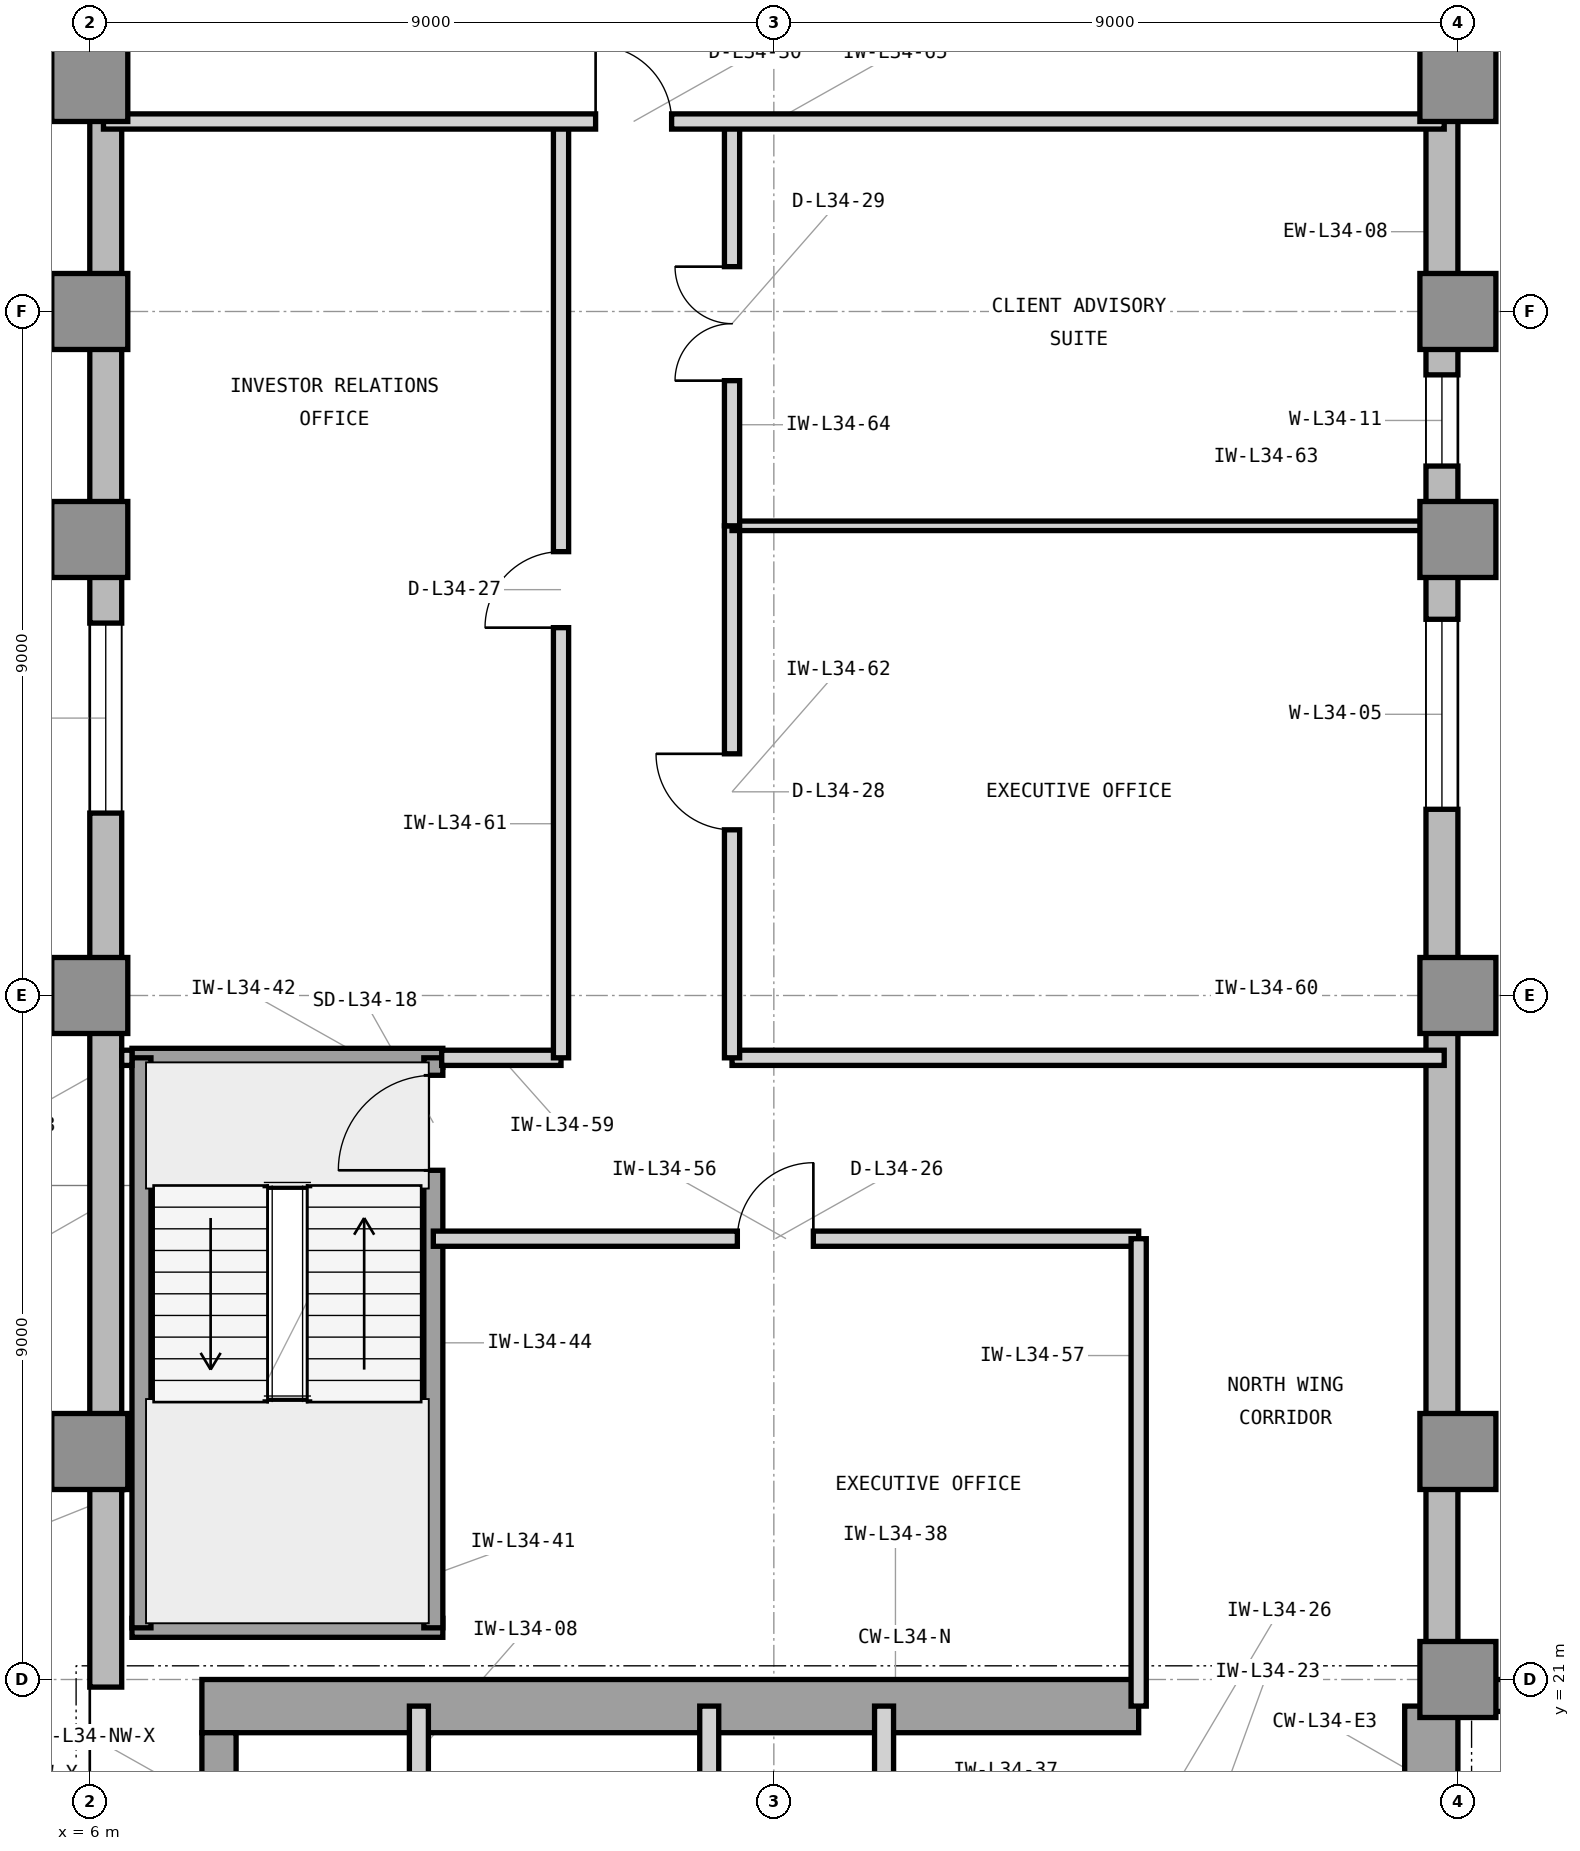
"""IFC4 building model, lengths in metres.
Left out: names, types, materials, properties, quantities, classifications, styles, units other than length and angle.
Written with IfcOpenShell. Run it as: python <this file> out.ifc"""

import sys

from ifc_helpers import new_model, si_unit, direction, frame, frame_2d, origin, origin_2d, place, context, subcontext, project, spatial, rectangle, extrude, element, fill, save


model = new_model("IFC4")
c1 = context("Model", 3, precision=1e-05, world=origin(), true_north=direction((0.0, 1.0)))
c2 = subcontext(c1, "Body", "Model", "MODEL_VIEW")
j1 = project(units=[si_unit("LENGTHUNIT", "METRE"), si_unit("PLANEANGLEUNIT", "RADIAN")], contexts=[c1])
p1 = place(None, origin())
s1 = spatial("IfcSite", under=j1, at=p1, CompositionType="ELEMENT")
p2 = place(p1, origin())
s2 = spatial("IfcBuilding", under=s1, at=p2, CompositionType="ELEMENT")
p3 = place(p2, frame((0.0, 0.0, 144.0)))
s3 = spatial("IfcBuildingStorey", under=s2, at=p3, CompositionType="ELEMENT", Elevation=144.0)
p4 = place(p3, frame((7.475, 20.65, 0.0), z_axis=(0.0, 0.0, 1.0), x_axis=(1.0, 0.0, 0.0)))
e1 = element("IfcWall", 1, at=p4, inside=s3, PredefinedType="SHEAR", context=c2, shape_type="SweptSolid", body=[
    extrude(rectangle(XDim=12.325, YDim=0.7, at=frame_2d((6.163, 0.0))), origin(), (0.0, 0.0, 1.0), 3.9),
])
p5 = place(p3, frame((23.65, 16.6, 0.0), z_axis=(0.0, 0.0, 1.0), x_axis=(0.0, 1.0, 0.0)))
e2 = element("IfcWall", 2, at=p5, inside=s3, PredefinedType="SHEAR", context=c2, shape_type="SweptSolid", body=[
    extrude(rectangle(XDim=4.05, YDim=0.7, at=frame_2d((2.025, 0.0))), origin(), (0.0, 0.0, 1.0), 3.9),
])
p6 = place(p3, frame((7.7, 19.575, 0.0), z_axis=(0.0, 0.0, 1.0), x_axis=(0.0, 1.0, 0.0)))
e3 = element("IfcWall", 3, at=p6, inside=s3, PredefinedType="SHEAR", context=c2, shape_type="SweptSolid", body=[
    extrude(rectangle(XDim=0.725, YDim=0.45, at=frame_2d((0.363, 0.0))), origin(), (0.0, 0.0, 1.0), 3.9),
])
for number, where, z_axis, x_axis in (
    (4, (24.0, 21.0, 0.0), (0.0, 0.0, 1.0), (1.0, 0.0, 0.0)),
    (5, (6.0, 24.0, 0.0), (0.0, 0.0, 1.0), (1.0, 0.0, 0.0)),
    (6, (24.0, 24.0, 0.0), (0.0, 0.0, 1.0), (1.0, 0.0, 0.0)),
    (7, (6.0, 30.0, 0.0), (0.0, 0.0, 1.0), (1.0, 0.0, 0.0)),
    (8, (24.0, 30.0, 0.0), (0.0, 0.0, 1.0), (1.0, 0.0, 0.0)),
    (9, (6.0, 36.0, 0.0), (0.0, 0.0, 1.0), (1.0, 0.0, 0.0)),
    (10, (24.0, 36.0, 0.0), (0.0, 0.0, 1.0), (1.0, 0.0, 0.0)),
    (11, (6.0, 39.0, 0.0), (0.0, 0.0, 1.0), (1.0, 0.0, 0.0)),
    (12, (24.0, 39.0, 0.0), (0.0, 0.0, 1.0), (1.0, 0.0, 0.0)),
    (13, (6.0, 42.0, 0.0), (0.0, 0.0, 1.0), (1.0, 0.0, 0.0)),
    (14, (24.0, 42.0, 0.0), (0.0, 0.0, 1.0), (1.0, 0.0, 0.0)),
):
    element("IfcColumn", number, at=place(p3, frame(where, z_axis=z_axis, x_axis=x_axis)), inside=s3, PredefinedType="COLUMN", context=c2, shape_type="SweptSolid", body=[
        extrude(rectangle(XDim=1.0, YDim=1.0, at=origin_2d()), origin(), (0.0, 0.0, 1.0), 3.9),
    ])
p7 = place(p3, frame((58.4, 20.79, 0.0), z_axis=(0.0, 0.0, 1.0), x_axis=(-1.0, 0.0, 0.0)))
e15 = element("IfcWall", 15, at=p7, inside=s3, PredefinedType="STANDARD", context=c2, shape_type="SweptSolid", body=[
    extrude(rectangle(XDim=34.4, YDim=0.42, at=frame_2d((17.2, 0.0))), origin(), (0.0, 0.0, 1.0), 3.7),
])
p8 = place(p7, frame((20.864, 0.0, 0.85)))
e16 = element("IfcOpeningElement", 16, at=p8, cuts=e15, PredefinedType="OPENING", context=c2, shape_type="SweptSolid", body=[
    extrude(rectangle(XDim=2.5, YDim=2.25, at=frame_2d((1.25, 1.125))), frame((0.0, 0.22, 0.0), z_axis=(0.0, -1.0, 0.0), x_axis=(1.0, 0.0, 0.0)), (0.0, 0.0, 1.0), 0.44),
])
p9 = place(p7, frame((32.222, 0.0, 0.85)))
e17 = element("IfcOpeningElement", 17, at=p9, cuts=e15, PredefinedType="OPENING", context=c2, shape_type="SweptSolid", body=[
    extrude(rectangle(XDim=1.2, YDim=2.25, at=frame_2d((0.6, 1.125))), frame((0.0, 0.22, 0.0), z_axis=(0.0, -1.0, 0.0), x_axis=(1.0, 0.0, 0.0)), (0.0, 0.0, 1.0), 0.44),
])
p10 = place(p7, frame((11.386, 0.0, 0.85)))
e18 = element("IfcOpeningElement", 18, at=p10, cuts=e15, PredefinedType="OPENING", context=c2, shape_type="SweptSolid", body=[
    extrude(rectangle(XDim=2.5, YDim=2.25, at=frame_2d((1.25, 1.125))), frame((0.0, 0.22, 0.0), z_axis=(0.0, -1.0, 0.0), x_axis=(1.0, 0.0, 0.0)), (0.0, 0.0, 1.0), 0.44),
])
p11 = place(p3, frame((23.79, 21.0, 0.0), z_axis=(0.0, 0.0, 1.0), x_axis=(0.0, 1.0, 0.0)))
e19 = element("IfcWall", 19, at=p11, inside=s3, PredefinedType="STANDARD", context=c2, shape_type="SweptSolid", body=[
    extrude(rectangle(XDim=25.4, YDim=0.42, at=frame_2d((12.7, 0.0))), origin(), (0.0, 0.0, 1.0), 3.7),
])
p12 = place(p11, frame((11.45, 0.0, 0.85)))
e20 = element("IfcOpeningElement", 20, at=p12, cuts=e19, PredefinedType="OPENING", context=c2, shape_type="SweptSolid", body=[
    extrude(rectangle(XDim=2.5, YDim=2.25, at=frame_2d((1.25, 1.125))), frame((0.0, 0.22, 0.0), z_axis=(0.0, -1.0, 0.0), x_axis=(1.0, 0.0, 0.0)), (0.0, 0.0, 1.0), 0.44),
])
p13 = place(p11, frame((15.966, 0.0, 0.85)))
e21 = element("IfcOpeningElement", 21, at=p13, cuts=e19, PredefinedType="OPENING", context=c2, shape_type="SweptSolid", body=[
    extrude(rectangle(XDim=1.2, YDim=2.25, at=frame_2d((0.6, 1.125))), frame((0.0, 0.22, 0.0), z_axis=(0.0, -1.0, 0.0), x_axis=(1.0, 0.0, 0.0)), (0.0, 0.0, 1.0), 0.44),
])
p14 = place(p3, frame((6.21, 46.4, 0.0), z_axis=(0.0, 0.0, 1.0), x_axis=(0.0, -1.0, 0.0)))
e22 = element("IfcWall", 22, at=p14, inside=s3, PredefinedType="STANDARD", context=c2, shape_type="SweptSolid", body=[
    extrude(rectangle(XDim=25.5, YDim=0.42, at=frame_2d((12.75, 0.0))), origin(), (0.0, 0.0, 1.0), 3.7),
])
p15 = place(p14, frame((11.5, 0.0, 0.85)))
e23 = element("IfcOpeningElement", 23, at=p15, cuts=e22, PredefinedType="OPENING", context=c2, shape_type="SweptSolid", body=[
    extrude(rectangle(XDim=2.5, YDim=2.25, at=frame_2d((1.25, 1.125))), frame((0.0, 0.22, 0.0), z_axis=(0.0, -1.0, 0.0), x_axis=(1.0, 0.0, 0.0)), (0.0, 0.0, 1.0), 0.44),
])
p16 = place(p3, frame((10.33, 19.45, 0.0), z_axis=(0.0, 0.0, 1.0), x_axis=(0.0, 1.0, 0.0)))
e24 = element("IfcWall", 24, at=p16, inside=s3, PredefinedType="PARTITIONING", context=c2, shape_type="SweptSolid", body=[
    extrude(rectangle(XDim=1.2, YDim=0.25, at=frame_2d((0.6, 0.0))), origin(), (0.0, 0.0, 1.0), 2.994),
])
for number, where, z_axis, x_axis in (
    (25, (14.15, 16.7, 0.0), (0.0, 0.0, 1.0), (0.0, 1.0, 0.0)),
    (26, (16.45, 16.7, 0.0), (0.0, 0.0, 1.0), (0.0, 1.0, 0.0)),
):
    element("IfcWall", number, at=place(p3, frame(where, z_axis=z_axis, x_axis=x_axis)), inside=s3, PredefinedType="PARTITIONING", context=c2, shape_type="SweptSolid", body=[
        extrude(rectangle(XDim=3.95, YDim=0.25, at=frame_2d((1.975, 0.0))), origin(), (0.0, 0.0, 1.0), 3.69),
    ])
for number, where, z_axis, x_axis in (
    (27, (6.555, 21.68, 0.0), (0.0, 0.0, 1.0), (1.0, 0.0, 0.0)),
    (28, (6.555, 29.18, 0.0), (0.0, 0.0, 1.0), (1.0, 0.0, 0.0)),
):
    element("IfcWall", number, at=place(p3, frame(where, z_axis=z_axis, x_axis=x_axis)), inside=s3, PredefinedType="SHEAR", context=c2, shape_type="SweptSolid", body=[
        extrude(rectangle(XDim=4.09, YDim=0.25, at=frame_2d((2.045, 0.0))), origin(), (0.0, 0.0, 1.0), 3.9),
    ])
p17 = place(p3, frame((6.68, 21.68, 0.0), z_axis=(0.0, 0.0, 1.0), x_axis=(0.0, 1.0, 0.0)))
e29 = element("IfcWall", 29, at=p17, inside=s3, PredefinedType="SHEAR", context=c2, shape_type="SweptSolid", body=[
    extrude(rectangle(XDim=7.5, YDim=0.25, at=frame_2d((3.75, 0.0))), origin(), (0.0, 0.0, 1.0), 3.9),
])
p18 = place(p3, frame((10.52, 21.68, 0.0), z_axis=(0.0, 0.0, 1.0), x_axis=(0.0, 1.0, 0.0)))
e30 = element("IfcWall", 30, at=p18, inside=s3, PredefinedType="SHEAR", context=c2, shape_type="SweptSolid", body=[
    extrude(rectangle(XDim=7.5, YDim=0.25, at=frame_2d((3.75, 0.0))), origin(), (0.0, 0.0, 1.0), 3.9),
])
p19 = place(p18, frame((6.02, 0.0, 0.0)))
e31 = element("IfcOpeningElement", 31, at=p19, cuts=e30, PredefinedType="OPENING", context=c2, shape_type="SweptSolid", body=[
    extrude(rectangle(XDim=1.25, YDim=2.2, at=frame_2d((0.625, 1.1))), frame((0.0, 0.135, 0.0), z_axis=(0.0, -1.0, 0.0), x_axis=(1.0, 0.0, 0.0)), (0.0, 0.0, 1.0), 0.27),
])
p20 = place(p3, frame((10.52, 26.8, 0.0), z_axis=(0.0, 0.0, 1.0), x_axis=(1.0, 0.0, 0.0)))
e32 = element("IfcWall", 32, at=p20, inside=s3, PredefinedType="PARTITIONING", context=c2, shape_type="SweptSolid", body=[
    extrude(rectangle(XDim=9.28, YDim=0.2, at=frame_2d((4.64, 0.0))), origin(), (0.0, 0.0, 1.0), 3.69),
])
p21 = place(p20, frame((4.0, 0.0, 0.0)))
e33 = element("IfcOpeningElement", 33, at=p21, cuts=e32, PredefinedType="OPENING", context=c2, shape_type="SweptSolid", body=[
    extrude(rectangle(XDim=1.0, YDim=2.15, at=frame_2d((0.5, 1.075))), frame((0.0, 0.11, 0.0), z_axis=(0.0, -1.0, 0.0), x_axis=(1.0, 0.0, 0.0)), (0.0, 0.0, 1.0), 0.22),
])
p22 = place(p3, frame((19.8, 20.65, 0.0), z_axis=(0.0, 0.0, 1.0), x_axis=(0.0, 1.0, 0.0)))
e34 = element("IfcWall", 34, at=p22, inside=s3, PredefinedType="PARTITIONING", context=c2, shape_type="SweptSolid", body=[
    extrude(rectangle(XDim=6.15, YDim=0.2, at=frame_2d((3.075, 0.0))), origin(), (0.0, 0.0, 1.0), 3.69),
])
p23 = place(p3, frame((6.42, 29.18, 0.0), z_axis=(0.0, 0.0, 1.0), x_axis=(1.0, 0.0, 0.0)))
e35 = element("IfcWall", 35, at=p23, inside=s3, PredefinedType="PARTITIONING", context=c2, shape_type="SweptSolid", body=[
    extrude(rectangle(XDim=0.135, YDim=0.2, at=frame_2d((0.067, 0.0))), origin(), (0.0, 0.0, 1.0), 3.69),
])
p24 = place(p3, frame((10.63, 29.18, 0.0), z_axis=(0.0, 0.0, 1.0), x_axis=(1.0, 0.0, 0.0)))
e36 = element("IfcWall", 36, at=p24, inside=s3, PredefinedType="PARTITIONING", context=c2, shape_type="SweptSolid", body=[
    extrude(rectangle(XDim=1.57, YDim=0.2, at=frame_2d((0.785, 0.0))), origin(), (0.0, 0.0, 1.0), 3.69),
])
p25 = place(p3, frame((14.45, 29.18, 0.0), z_axis=(0.0, 0.0, 1.0), x_axis=(1.0, 0.0, 0.0)))
e37 = element("IfcWall", 37, at=p25, inside=s3, PredefinedType="PARTITIONING", context=c2, shape_type="SweptSolid", body=[
    extrude(rectangle(XDim=9.37, YDim=0.2, at=frame_2d((4.685, 0.0))), origin(), (0.0, 0.0, 1.0), 3.69),
])
p26 = place(p3, frame((12.2, 29.18, 0.0), z_axis=(0.0, 0.0, 1.0), x_axis=(0.0, 1.0, 0.0)))
e38 = element("IfcWall", 38, at=p26, inside=s3, PredefinedType="PARTITIONING", context=c2, shape_type="SweptSolid", body=[
    extrude(rectangle(XDim=12.32, YDim=0.2, at=frame_2d((6.16, 0.0))), origin(), (0.0, 0.0, 1.0), 3.69),
])
p27 = place(p26, frame((5.66, 0.0, 0.0)))
e39 = element("IfcOpeningElement", 39, at=p27, cuts=e38, PredefinedType="OPENING", context=c2, shape_type="SweptSolid", body=[
    extrude(rectangle(XDim=1.0, YDim=2.15, at=frame_2d((0.5, 1.075))), frame((0.0, 0.11, 0.0), z_axis=(0.0, -1.0, 0.0), x_axis=(1.0, 0.0, 0.0)), (0.0, 0.0, 1.0), 0.22),
])
p28 = place(p3, frame((14.45, 29.18, 0.0), z_axis=(0.0, 0.0, 1.0), x_axis=(0.0, 1.0, 0.0)))
e40 = element("IfcWall", 40, at=p28, inside=s3, PredefinedType="PARTITIONING", context=c2, shape_type="SweptSolid", body=[
    extrude(rectangle(XDim=7.0, YDim=0.2, at=frame_2d((3.5, 0.0))), origin(), (0.0, 0.0, 1.0), 3.69),
])
p29 = place(p28, frame((3.0, 0.0, 0.0)))
e41 = element("IfcOpeningElement", 41, at=p29, cuts=e40, PredefinedType="OPENING", context=c2, shape_type="SweptSolid", body=[
    extrude(rectangle(XDim=1.0, YDim=2.15, at=frame_2d((0.5, 1.075))), frame((0.0, 0.11, 0.0), z_axis=(0.0, -1.0, 0.0), x_axis=(1.0, 0.0, 0.0)), (0.0, 0.0, 1.0), 0.22),
])
p30 = place(p3, frame((14.45, 36.18, 0.0), z_axis=(0.0, 0.0, 1.0), x_axis=(1.0, 0.0, 0.0)))
e42 = element("IfcWall", 42, at=p30, inside=s3, PredefinedType="PARTITIONING", context=c2, shape_type="SweptSolid", body=[
    extrude(rectangle(XDim=9.37, YDim=0.125, at=frame_2d((4.685, 0.0))), origin(), (0.0, 0.0, 1.0), 3.69),
])
p31 = place(p3, frame((14.45, 36.18, 0.0), z_axis=(0.0, 0.0, 1.0), x_axis=(0.0, 1.0, 0.0)))
e43 = element("IfcWall", 43, at=p31, inside=s3, PredefinedType="PARTITIONING", context=c2, shape_type="SweptSolid", body=[
    extrude(rectangle(XDim=5.32, YDim=0.2, at=frame_2d((2.66, 0.0))), origin(), (0.0, 0.0, 1.0), 3.69),
])
p32 = place(p31, frame((1.91, 0.0, 0.0)))
e44 = element("IfcOpeningElement", 44, at=p32, cuts=e43, PredefinedType="OPENING", context=c2, shape_type="SweptSolid", body=[
    extrude(rectangle(XDim=1.5, YDim=2.3, at=frame_2d((0.75, 1.15))), frame((0.0, 0.11, 0.0), z_axis=(0.0, -1.0, 0.0), x_axis=(1.0, 0.0, 0.0)), (0.0, 0.0, 1.0), 0.22),
])
p33 = place(p3, frame((6.18, 41.5, 0.0), z_axis=(0.0, 0.0, 1.0), x_axis=(1.0, 0.0, 0.0)))
e45 = element("IfcWall", 45, at=p33, inside=s3, PredefinedType="PARTITIONING", context=c2, shape_type="SweptSolid", body=[
    extrude(rectangle(XDim=17.64, YDim=0.2, at=frame_2d((8.82, 0.0))), origin(), (0.0, 0.0, 1.0), 3.69),
])
p34 = place(p33, frame((6.475, 0.0, 0.0)))
e46 = element("IfcOpeningElement", 46, at=p34, cuts=e45, PredefinedType="OPENING", context=c2, shape_type="SweptSolid", body=[
    extrude(rectangle(XDim=1.0, YDim=2.15, at=frame_2d((0.5, 1.075))), frame((0.0, 0.11, 0.0), z_axis=(0.0, -1.0, 0.0), x_axis=(1.0, 0.0, 0.0)), (0.0, 0.0, 1.0), 0.22),
])
p35 = place(p12, origin())
e47 = element("IfcWindow", 47, at=p35, inside=s3, PartitioningType="SINGLE_PANEL", PredefinedType="WINDOW", context=c2, shape_type="SweptSolid", body=[
    extrude(rectangle(XDim=2.5, YDim=2.25, at=frame_2d((1.25, 1.125))), frame((0.0, 0.11, 0.0), z_axis=(0.0, -1.0, 0.0), x_axis=(1.0, 0.0, 0.0)), (0.0, 0.0, 1.0), 0.06),
])
fill(e20, e47)
p36 = place(p15, origin())
e48 = element("IfcWindow", 48, at=p36, inside=s3, PartitioningType="SINGLE_PANEL", PredefinedType="WINDOW", context=c2, shape_type="SweptSolid", body=[
    extrude(rectangle(XDim=2.5, YDim=2.25, at=frame_2d((1.25, 1.125))), frame((0.0, 0.11, 0.0), z_axis=(0.0, -1.0, 0.0), x_axis=(1.0, 0.0, 0.0)), (0.0, 0.0, 1.0), 0.06),
])
fill(e23, e48)
p37 = place(p19, origin())
e49 = element("IfcDoor", 49, at=p37, inside=s3, OperationType="SINGLE_SWING_LEFT", PredefinedType="DOOR", context=c2, shape_type="SweptSolid", body=[
    extrude(rectangle(XDim=1.25, YDim=2.2, at=frame_2d((0.625, 1.1))), frame((0.0, 0.025, 0.0), z_axis=(0.0, -1.0, 0.0), x_axis=(1.0, 0.0, 0.0)), (0.0, 0.0, 1.0), 0.05),
])
fill(e31, e49)
p38 = place(p21, origin())
e50 = element("IfcDoor", 50, at=p38, inside=s3, OperationType="SINGLE_SWING_RIGHT", PredefinedType="DOOR", context=c2, shape_type="SweptSolid", body=[
    extrude(rectangle(XDim=1.0, YDim=2.15, at=frame_2d((0.5, 1.075))), frame((0.0, 0.025, 0.0), z_axis=(0.0, -1.0, 0.0), x_axis=(1.0, 0.0, 0.0)), (0.0, 0.0, 1.0), 0.05),
])
fill(e33, e50)
p39 = place(p27, origin())
e51 = element("IfcDoor", 51, at=p39, inside=s3, OperationType="SINGLE_SWING_LEFT", PredefinedType="DOOR", context=c2, shape_type="SweptSolid", body=[
    extrude(rectangle(XDim=1.0, YDim=2.15, at=frame_2d((0.5, 1.075))), frame((0.0, 0.025, 0.0), z_axis=(0.0, -1.0, 0.0), x_axis=(1.0, 0.0, 0.0)), (0.0, 0.0, 1.0), 0.05),
])
fill(e39, e51)
p40 = place(p29, origin())
e52 = element("IfcDoor", 52, at=p40, inside=s3, OperationType="SINGLE_SWING_RIGHT", PredefinedType="DOOR", context=c2, shape_type="SweptSolid", body=[
    extrude(rectangle(XDim=1.0, YDim=2.15, at=frame_2d((0.5, 1.075))), frame((0.0, 0.025, 0.0), z_axis=(0.0, -1.0, 0.0), x_axis=(1.0, 0.0, 0.0)), (0.0, 0.0, 1.0), 0.05),
])
fill(e41, e52)
p41 = place(p32, origin())
e53 = element("IfcDoor", 53, at=p41, inside=s3, OperationType="DOUBLE_DOOR_SINGLE_SWING", PredefinedType="DOOR", context=c2, shape_type="SweptSolid", body=[
    extrude(rectangle(XDim=1.5, YDim=2.3, at=frame_2d((0.75, 1.15))), frame((0.0, 0.025, 0.0), z_axis=(0.0, -1.0, 0.0), x_axis=(1.0, 0.0, 0.0)), (0.0, 0.0, 1.0), 0.05),
])
fill(e44, e53)
p42 = place(p34, origin())
e54 = element("IfcDoor", 54, at=p42, inside=s3, OperationType="SINGLE_SWING_LEFT", PredefinedType="DOOR", context=c2, shape_type="SweptSolid", body=[
    extrude(rectangle(XDim=1.0, YDim=2.15, at=frame_2d((0.5, 1.075))), frame((0.0, 0.025, 0.0), z_axis=(0.0, -1.0, 0.0), x_axis=(1.0, 0.0, 0.0)), (0.0, 0.0, 1.0), 0.05),
])
fill(e46, e54)
p43 = place(p13, origin())
e55 = element("IfcWindow", 55, at=p43, inside=s3, PartitioningType="SINGLE_PANEL", PredefinedType="WINDOW", context=c2, shape_type="SweptSolid", body=[
    extrude(rectangle(XDim=1.2, YDim=2.25, at=frame_2d((0.6, 1.125))), frame((0.0, 0.11, 0.0), z_axis=(0.0, -1.0, 0.0), x_axis=(1.0, 0.0, 0.0)), (0.0, 0.0, 1.0), 0.06),
])
fill(e21, e55)
save(model, sys.argv[1])
